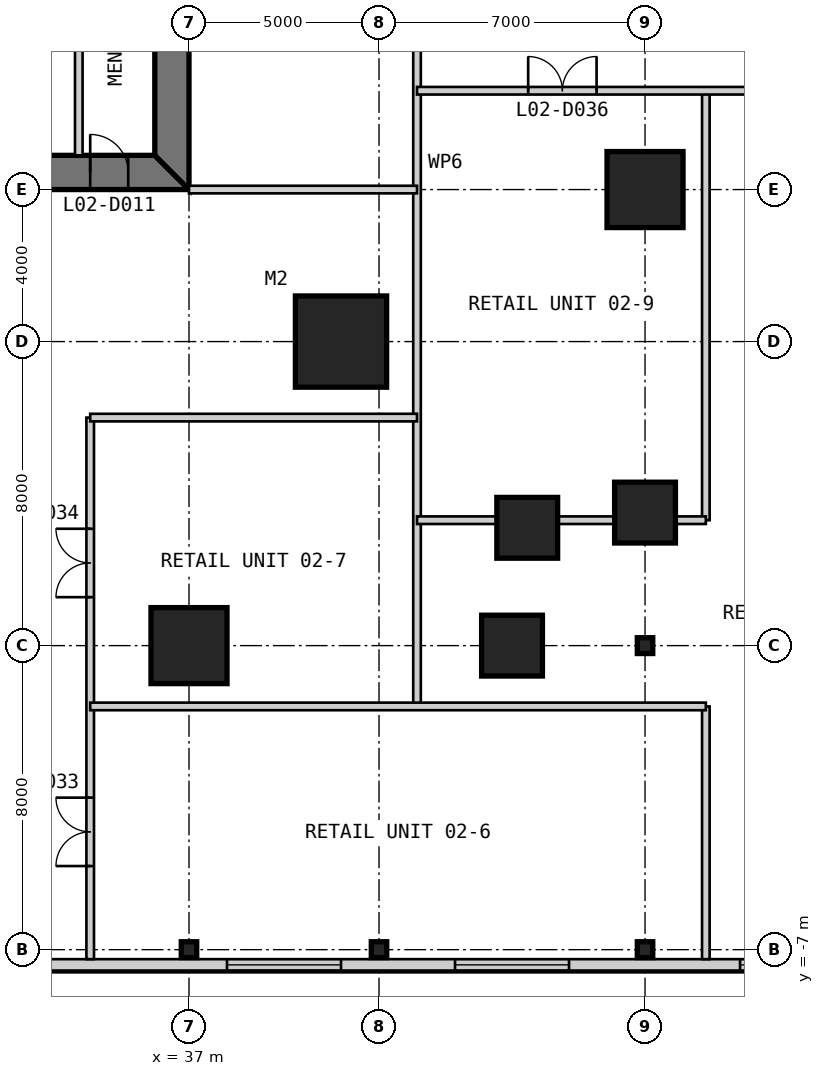
"""IFC4 building model, lengths in metres.
Left out: names, types, materials, properties, quantities, classifications, styles, units other than length and angle.
Written with IfcOpenShell. Run it as: python <this file> out.ifc"""

import sys

from ifc_helpers import new_model, si_unit, direction, frame, frame_2d, origin, origin_2d, place, context, subcontext, project, spatial, polyline, rectangle, i_section, outline, extrude, element, fill, save


model = new_model("IFC4")
c1 = context("Model", 3, precision=1e-05, world=origin(), true_north=direction((0.0, 1.0)))
c2 = subcontext(c1, "Body", "Model", "MODEL_VIEW")
j1 = project(units=[si_unit("LENGTHUNIT", "METRE"), si_unit("PLANEANGLEUNIT", "RADIAN")], contexts=[c1])
p1 = place(None, origin())
s1 = spatial("IfcSite", under=j1, at=p1, CompositionType="ELEMENT")
p2 = place(p1, origin())
s2 = spatial("IfcBuilding", under=s1, at=p2, CompositionType="ELEMENT")
p3 = place(p2, frame((0.0, 0.0, 11.8)))
s3 = spatial("IfcBuildingStorey", under=s2, at=p3, CompositionType="ELEMENT", Elevation=11.8)
p4 = place(p3, frame((41.0, 9.0, 0.0), z_axis=(0.0, 0.0, 1.0), x_axis=(1.0, 0.0, 0.0)))
e1 = element("IfcColumn", 1, at=p4, inside=s3, PredefinedType="COLUMN", context=c2, shape_type="SweptSolid", body=[
    extrude(rectangle(XDim=2.4, YDim=2.4, at=origin_2d()), origin(), (0.0, 0.0, 1.0), 4.8),
])
p5 = place(p3, frame((37.0, 1.0, 0.0), z_axis=(0.0, 0.0, 1.0), x_axis=(1.0, 0.0, 0.0)))
e2 = element("IfcColumn", 2, at=p5, inside=s3, PredefinedType="COLUMN", context=c2, shape_type="SweptSolid", body=[
    extrude(rectangle(XDim=2.0, YDim=2.0, at=origin_2d()), origin(), (0.0, 0.0, 1.0), 4.8),
])
for number, where, z_axis, x_axis in (
    (3, (45.5, 1.0, 0.0), (0.0, 0.0, 1.0), (1.0, 0.0, 0.0)),
    (4, (45.9, 4.1, 0.0), (0.0, 0.0, 1.0), (1.0, 0.0, 0.0)),
    (5, (49.0, 4.5, 0.0), (0.0, 0.0, 1.0), (1.0, 0.0, 0.0)),
):
    element("IfcColumn", number, at=place(p3, frame(where, z_axis=z_axis, x_axis=x_axis)), inside=s3, PredefinedType="COLUMN", context=c2, shape_type="SweptSolid", body=[
        extrude(rectangle(XDim=1.6, YDim=1.6, at=origin_2d()), origin(), (0.0, 0.0, 1.0), 4.8),
    ])
p6 = place(p3, frame((49.0, 13.0, 0.0), z_axis=(0.0, 0.0, 1.0), x_axis=(1.0, 0.0, 0.0)))
e6 = element("IfcColumn", 6, at=p6, inside=s3, PredefinedType="COLUMN", context=c2, shape_type="SweptSolid", body=[
    extrude(rectangle(XDim=2.0, YDim=2.0, at=origin_2d()), origin(), (0.0, 0.0, 1.0), 4.8),
])
for number, where, z_axis, x_axis in (
    (7, (37.0, -7.0, 0.0), (0.0, 0.0, 1.0), (1.0, 0.0, 0.0)),
    (8, (42.0, -7.0, 0.0), (0.0, 0.0, 1.0), (1.0, 0.0, 0.0)),
    (9, (49.0, -7.0, 0.0), (0.0, 0.0, 1.0), (1.0, 0.0, 0.0)),
    (10, (49.0, 1.0, 0.0), (0.0, 0.0, 1.0), (1.0, 0.0, 0.0)),
):
    element("IfcColumn", number, at=place(p3, frame(where, z_axis=z_axis, x_axis=x_axis)), inside=s3, PredefinedType="COLUMN", context=c2, shape_type="SweptSolid", body=[
        extrude(i_section(OverallWidth=0.406, OverallDepth=0.417, WebThickness=0.03, FlangeThickness=0.048, at=origin_2d()), origin(), (0.0, 0.0, 1.0), 4.8),
    ])
p7 = place(p3, frame((13.0, 13.45, 0.0), z_axis=(0.0, 0.0, 1.0), x_axis=(1.0, 0.0, 0.0)))
e11 = element("IfcWall", 11, at=p7, inside=s3, PredefinedType="SHEAR", context=c2, shape_type="SweptSolid", body=[
    extrude(outline(polyline([(0.0, -0.45), (24.0, -0.45), (23.1, 0.45), (0.9, 0.45), (0.0, -0.45)])), origin(), (0.0, 0.0, 1.0), 4.8),
])
p8 = place(p7, frame((4.9, 0.0, 0.0)))
e12 = element("IfcOpeningElement", 12, at=p8, cuts=e11, PredefinedType="OPENING", context=c2, shape_type="SweptSolid", body=[
    extrude(rectangle(XDim=1.0, YDim=2.2, at=frame_2d((0.5, 1.1))), frame((0.0, 0.46, 0.0), z_axis=(0.0, -1.0, 0.0), x_axis=(1.0, 0.0, 0.0)), (0.0, 0.0, 1.0), 0.92),
])
p9 = place(p7, frame((8.9, 0.0, 0.0)))
e13 = element("IfcOpeningElement", 13, at=p9, cuts=e11, PredefinedType="OPENING", context=c2, shape_type="SweptSolid", body=[
    extrude(rectangle(XDim=1.1, YDim=2.2, at=frame_2d((0.55, 1.1))), frame((0.0, 0.46, 0.0), z_axis=(0.0, -1.0, 0.0), x_axis=(1.0, 0.0, 0.0)), (0.0, 0.0, 1.0), 0.92),
])
p10 = place(p7, frame((15.05, 0.0, 0.0)))
e14 = element("IfcOpeningElement", 14, at=p10, cuts=e11, PredefinedType="OPENING", context=c2, shape_type="SweptSolid", body=[
    extrude(rectangle(XDim=0.9, YDim=2.2, at=frame_2d((0.45, 1.1))), frame((0.0, 0.46, 0.0), z_axis=(0.0, -1.0, 0.0), x_axis=(1.0, 0.0, 0.0)), (0.0, 0.0, 1.0), 0.92),
])
p11 = place(p7, frame((17.9, 0.0, 0.0)))
e15 = element("IfcOpeningElement", 15, at=p11, cuts=e11, PredefinedType="OPENING", context=c2, shape_type="SweptSolid", body=[
    extrude(rectangle(XDim=1.0, YDim=2.2, at=frame_2d((0.5, 1.1))), frame((0.0, 0.46, 0.0), z_axis=(0.0, -1.0, 0.0), x_axis=(1.0, 0.0, 0.0)), (0.0, 0.0, 1.0), 0.92),
])
p12 = place(p7, frame((21.4, 0.0, 0.0)))
e16 = element("IfcOpeningElement", 16, at=p12, cuts=e11, PredefinedType="OPENING", context=c2, shape_type="SweptSolid", body=[
    extrude(rectangle(XDim=1.0, YDim=2.2, at=frame_2d((0.5, 1.1))), frame((0.0, 0.46, 0.0), z_axis=(0.0, -1.0, 0.0), x_axis=(1.0, 0.0, 0.0)), (0.0, 0.0, 1.0), 0.92),
])
p13 = place(p3, frame((36.55, 13.9, 0.0), z_axis=(0.0, 0.0, 1.0), x_axis=(0.0, 1.0, 0.0)))
e17 = element("IfcWall", 17, at=p13, inside=s3, PredefinedType="SHEAR", context=c2, shape_type="SweptSolid", body=[
    extrude(outline(polyline([(-0.9, -0.45), (23.1, -0.45), (22.2, 0.45), (0.0, 0.45), (-0.9, -0.45)])), origin(), (0.0, 0.0, 1.0), 4.8),
])
p14 = place(p13, frame((20.2, 0.0, 0.0)))
e18 = element("IfcOpeningElement", 18, at=p14, cuts=e17, PredefinedType="OPENING", context=c2, shape_type="SweptSolid", body=[
    extrude(rectangle(XDim=1.0, YDim=2.2, at=frame_2d((0.5, 1.1))), frame((0.0, 0.46, 0.0), z_axis=(0.0, -1.0, 0.0), x_axis=(1.0, 0.0, 0.0)), (0.0, 0.0, 1.0), 0.92),
])
p15 = place(p13, frame((17.25, 0.0, 0.0)))
e19 = element("IfcOpeningElement", 19, at=p15, cuts=e17, PredefinedType="OPENING", context=c2, shape_type="SweptSolid", body=[
    extrude(rectangle(XDim=0.9, YDim=2.2, at=frame_2d((0.45, 1.1))), frame((0.0, 0.46, 0.0), z_axis=(0.0, -1.0, 0.0), x_axis=(1.0, 0.0, 0.0)), (0.0, 0.0, 1.0), 0.92),
])
p16 = place(p3, frame((-15.55, -7.4, 0.0), z_axis=(0.0, 0.0, 1.0), x_axis=(1.0, 0.0, 0.0)))
e20 = element("IfcWall", 20, at=p16, inside=s3, PredefinedType="SOLIDWALL", context=c2, shape_type="SweptSolid", body=[
    extrude(rectangle(XDim=73.1, YDim=0.3, at=frame_2d((36.55, 0.0))), origin(), (0.0, 0.0, 1.0), 4.5),
])
p17 = place(p16, frame((11.65, 0.0, 0.0)))
e21 = element("IfcOpeningElement", 21, at=p17, cuts=e20, PredefinedType="OPENING", context=c2, shape_type="SweptSolid", body=[
    extrude(rectangle(XDim=1.8, YDim=2.4, at=frame_2d((0.9, 1.2))), frame((0.0, 0.16, 0.0), z_axis=(0.0, -1.0, 0.0), x_axis=(1.0, 0.0, 0.0)), (0.0, 0.0, 1.0), 0.32),
])
p18 = place(p16, frame((45.65, 0.0, 0.0)))
e22 = element("IfcOpeningElement", 22, at=p18, cuts=e20, PredefinedType="OPENING", context=c2, shape_type="SweptSolid", body=[
    extrude(rectangle(XDim=1.8, YDim=2.4, at=frame_2d((0.9, 1.2))), frame((0.0, 0.16, 0.0), z_axis=(0.0, -1.0, 0.0), x_axis=(1.0, 0.0, 0.0)), (0.0, 0.0, 1.0), 0.32),
])
p19 = place(p16, frame((3.05, 0.0, 0.9)))
e23 = element("IfcOpeningElement", 23, at=p19, cuts=e20, PredefinedType="OPENING", context=c2, shape_type="SweptSolid", body=[
    extrude(rectangle(XDim=3.0, YDim=2.4, at=frame_2d((1.5, 1.2))), frame((0.0, 0.16, 0.0), z_axis=(0.0, -1.0, 0.0), x_axis=(1.0, 0.0, 0.0)), (0.0, 0.0, 1.0), 0.32),
])
p20 = place(p16, frame((19.05, 0.0, 0.9)))
e24 = element("IfcOpeningElement", 24, at=p20, cuts=e20, PredefinedType="OPENING", context=c2, shape_type="SweptSolid", body=[
    extrude(rectangle(XDim=3.0, YDim=2.4, at=frame_2d((1.5, 1.2))), frame((0.0, 0.16, 0.0), z_axis=(0.0, -1.0, 0.0), x_axis=(1.0, 0.0, 0.0)), (0.0, 0.0, 1.0), 0.32),
])
p21 = place(p16, frame((33.05, 0.0, 0.9)))
e25 = element("IfcOpeningElement", 25, at=p21, cuts=e20, PredefinedType="OPENING", context=c2, shape_type="SweptSolid", body=[
    extrude(rectangle(XDim=3.0, YDim=2.4, at=frame_2d((1.5, 1.2))), frame((0.0, 0.16, 0.0), z_axis=(0.0, -1.0, 0.0), x_axis=(1.0, 0.0, 0.0)), (0.0, 0.0, 1.0), 0.32),
])
p22 = place(p16, frame((53.55, 0.0, 0.9)))
e26 = element("IfcOpeningElement", 26, at=p22, cuts=e20, PredefinedType="OPENING", context=c2, shape_type="SweptSolid", body=[
    extrude(rectangle(XDim=3.0, YDim=2.4, at=frame_2d((1.5, 1.2))), frame((0.0, 0.16, 0.0), z_axis=(0.0, -1.0, 0.0), x_axis=(1.0, 0.0, 0.0)), (0.0, 0.0, 1.0), 0.32),
])
p23 = place(p16, frame((59.55, 0.0, 0.9)))
e27 = element("IfcOpeningElement", 27, at=p23, cuts=e20, PredefinedType="OPENING", context=c2, shape_type="SweptSolid", body=[
    extrude(rectangle(XDim=3.0, YDim=2.4, at=frame_2d((1.5, 1.2))), frame((0.0, 0.16, 0.0), z_axis=(0.0, -1.0, 0.0), x_axis=(1.0, 0.0, 0.0)), (0.0, 0.0, 1.0), 0.32),
])
p24 = place(p16, frame((67.05, 0.0, 0.9)))
e28 = element("IfcOpeningElement", 28, at=p24, cuts=e20, PredefinedType="OPENING", context=c2, shape_type="SweptSolid", body=[
    extrude(rectangle(XDim=3.0, YDim=2.4, at=frame_2d((1.5, 1.2))), frame((0.0, 0.16, 0.0), z_axis=(0.0, -1.0, 0.0), x_axis=(1.0, 0.0, 0.0)), (0.0, 0.0, 1.0), 0.32),
])
p25 = place(p3, frame((34.1, 13.9, 0.0), z_axis=(0.0, 0.0, 1.0), x_axis=(0.0, 1.0, 0.0)))
e29 = element("IfcWall", 29, at=p25, inside=s3, PredefinedType="PARTITIONING", context=c2, shape_type="SweptSolid", body=[
    extrude(rectangle(XDim=6.1, YDim=0.2, at=frame_2d((3.05, 0.0))), origin(), (0.0, 0.0, 1.0), 4.6),
])
p26 = place(p3, frame((34.4, -7.25, 0.0), z_axis=(0.0, 0.0, 1.0), x_axis=(0.0, 1.0, 0.0)))
e30 = element("IfcWall", 30, at=p26, inside=s3, PredefinedType="PARTITIONING", context=c2, shape_type="SweptSolid", body=[
    extrude(rectangle(XDim=14.25, YDim=0.2, at=frame_2d((7.125, 0.0))), origin(), (0.0, 0.0, 1.0), 4.5),
])
p27 = place(p26, frame((2.45, 0.0, 0.0)))
e31 = element("IfcOpeningElement", 31, at=p27, cuts=e30, PredefinedType="OPENING", context=c2, shape_type="SweptSolid", body=[
    extrude(rectangle(XDim=1.8, YDim=2.4, at=frame_2d((0.9, 1.2))), frame((0.0, 0.11, 0.0), z_axis=(0.0, -1.0, 0.0), x_axis=(1.0, 0.0, 0.0)), (0.0, 0.0, 1.0), 0.22),
])
p28 = place(p26, frame((9.525, 0.0, 0.0)))
e32 = element("IfcOpeningElement", 32, at=p28, cuts=e30, PredefinedType="OPENING", context=c2, shape_type="SweptSolid", body=[
    extrude(rectangle(XDim=1.8, YDim=2.4, at=frame_2d((0.9, 1.2))), frame((0.0, 0.11, 0.0), z_axis=(0.0, -1.0, 0.0), x_axis=(1.0, 0.0, 0.0)), (0.0, 0.0, 1.0), 0.22),
])
p29 = place(p3, frame((43.0, -0.6, 0.0), z_axis=(0.0, 0.0, 1.0), x_axis=(0.0, 1.0, 0.0)))
e33 = element("IfcWall", 33, at=p29, inside=s3, PredefinedType="PARTITIONING", context=c2, shape_type="SweptSolid", body=[
    extrude(rectangle(XDim=28.6, YDim=0.2, at=frame_2d((14.3, 0.0))), origin(), (0.0, 0.0, 1.0), 3.843),
])
p30 = place(p3, frame((50.6, -7.25, 0.0), z_axis=(0.0, 0.0, 1.0), x_axis=(0.0, 1.0, 0.0)))
e34 = element("IfcWall", 34, at=p30, inside=s3, PredefinedType="PARTITIONING", context=c2, shape_type="SweptSolid", body=[
    extrude(rectangle(XDim=6.65, YDim=0.2, at=frame_2d((3.325, 0.0))), origin(), (0.0, 0.0, 1.0), 4.5),
])
p31 = place(p3, frame((50.6, 4.3, 0.0), z_axis=(0.0, 0.0, 1.0), x_axis=(0.0, 1.0, 0.0)))
e35 = element("IfcWall", 35, at=p31, inside=s3, PredefinedType="PARTITIONING", context=c2, shape_type="SweptSolid", body=[
    extrude(rectangle(XDim=11.3, YDim=0.2, at=frame_2d((5.65, 0.0))), origin(), (0.0, 0.0, 1.0), 4.5),
])
p32 = place(p3, frame((34.4, -0.6, 0.0), z_axis=(0.0, 0.0, 1.0), x_axis=(1.0, 0.0, 0.0)))
e36 = element("IfcWall", 36, at=p32, inside=s3, PredefinedType="PARTITIONING", context=c2, shape_type="SweptSolid", body=[
    extrude(rectangle(XDim=16.2, YDim=0.2, at=frame_2d((8.1, 0.0))), origin(), (0.0, 0.0, 1.0), 4.5),
])
p33 = place(p3, frame((43.0, 4.3, 0.0), z_axis=(0.0, 0.0, 1.0), x_axis=(1.0, 0.0, 0.0)))
e37 = element("IfcWall", 37, at=p33, inside=s3, PredefinedType="PARTITIONING", context=c2, shape_type="SweptSolid", body=[
    extrude(rectangle(XDim=2.1, YDim=0.2, at=frame_2d((1.05, 0.0))), origin(), (0.0, 0.0, 1.0), 4.5),
])
p34 = place(p3, frame((46.7, 4.3, 0.0), z_axis=(0.0, 0.0, 1.0), x_axis=(1.0, 0.0, 0.0)))
e38 = element("IfcWall", 38, at=p34, inside=s3, PredefinedType="PARTITIONING", context=c2, shape_type="SweptSolid", body=[
    extrude(rectangle(XDim=1.5, YDim=0.2, at=frame_2d((0.75, 0.0))), origin(), (0.0, 0.0, 1.0), 3.65),
])
p35 = place(p3, frame((49.8, 4.3, 0.0), z_axis=(0.0, 0.0, 1.0), x_axis=(1.0, 0.0, 0.0)))
e39 = element("IfcWall", 39, at=p35, inside=s3, PredefinedType="PARTITIONING", context=c2, shape_type="SweptSolid", body=[
    extrude(rectangle(XDim=0.8, YDim=0.2, at=frame_2d((0.4, 0.0))), origin(), (0.0, 0.0, 1.0), 4.5),
])
p36 = place(p3, frame((34.4, 7.0, 0.0), z_axis=(0.0, 0.0, 1.0), x_axis=(1.0, 0.0, 0.0)))
e40 = element("IfcWall", 40, at=p36, inside=s3, PredefinedType="PARTITIONING", context=c2, shape_type="SweptSolid", body=[
    extrude(rectangle(XDim=8.6, YDim=0.2, at=frame_2d((4.3, 0.0))), origin(), (0.0, 0.0, 1.0), 4.5),
])
p37 = place(p3, frame((37.0, 13.0, 0.0), z_axis=(0.0, 0.0, 1.0), x_axis=(1.0, 0.0, 0.0)))
e41 = element("IfcWall", 41, at=p37, inside=s3, PredefinedType="PARTITIONING", context=c2, shape_type="SweptSolid", body=[
    extrude(rectangle(XDim=6.0, YDim=0.2, at=frame_2d((3.0, 0.0))), origin(), (0.0, 0.0, 1.0), 3.653),
])
p38 = place(p3, frame((43.0, 15.6, 0.0), z_axis=(0.0, 0.0, 1.0), x_axis=(1.0, 0.0, 0.0)))
e42 = element("IfcWall", 42, at=p38, inside=s3, PredefinedType="PARTITIONING", context=c2, shape_type="SweptSolid", body=[
    extrude(rectangle(XDim=14.25, YDim=0.2, at=frame_2d((7.125, 0.0))), origin(), (0.0, 0.0, 1.0), 4.5),
])
p39 = place(p38, frame((10.0, 0.0, 0.0)))
e43 = element("IfcOpeningElement", 43, at=p39, cuts=e42, PredefinedType="OPENING", context=c2, shape_type="SweptSolid", body=[
    extrude(rectangle(XDim=1.8, YDim=2.4, at=frame_2d((0.9, 1.2))), frame((0.0, 0.11, 0.0), z_axis=(0.0, -1.0, 0.0), x_axis=(1.0, 0.0, 0.0)), (0.0, 0.0, 1.0), 0.22),
])
p40 = place(p38, frame((2.925, 0.0, 0.0)))
e44 = element("IfcOpeningElement", 44, at=p40, cuts=e42, PredefinedType="OPENING", context=c2, shape_type="SweptSolid", body=[
    extrude(rectangle(XDim=1.8, YDim=2.4, at=frame_2d((0.9, 1.2))), frame((0.0, 0.11, 0.0), z_axis=(0.0, -1.0, 0.0), x_axis=(1.0, 0.0, 0.0)), (0.0, 0.0, 1.0), 0.22),
])
p41 = place(p22, origin())
e45 = element("IfcWindow", 45, at=p41, inside=s3, PartitioningType="SINGLE_PANEL", PredefinedType="WINDOW", context=c2, shape_type="SweptSolid", body=[
    extrude(rectangle(XDim=3.0, YDim=2.4, at=frame_2d((1.5, 1.2))), frame((0.0, 0.03, 0.0), z_axis=(0.0, -1.0, 0.0), x_axis=(1.0, 0.0, 0.0)), (0.0, 0.0, 1.0), 0.06),
])
fill(e26, e45)
p42 = place(p23, origin())
e46 = element("IfcWindow", 46, at=p42, inside=s3, PartitioningType="SINGLE_PANEL", PredefinedType="WINDOW", context=c2, shape_type="SweptSolid", body=[
    extrude(rectangle(XDim=3.0, YDim=2.4, at=frame_2d((1.5, 1.2))), frame((0.0, 0.03, 0.0), z_axis=(0.0, -1.0, 0.0), x_axis=(1.0, 0.0, 0.0)), (0.0, 0.0, 1.0), 0.06),
])
fill(e27, e46)
p43 = place(p24, origin())
e47 = element("IfcWindow", 47, at=p43, inside=s3, PartitioningType="SINGLE_PANEL", PredefinedType="WINDOW", context=c2, shape_type="SweptSolid", body=[
    extrude(rectangle(XDim=3.0, YDim=2.4, at=frame_2d((1.5, 1.2))), frame((0.0, 0.03, 0.0), z_axis=(0.0, -1.0, 0.0), x_axis=(1.0, 0.0, 0.0)), (0.0, 0.0, 1.0), 0.06),
])
fill(e28, e47)
p44 = place(p12, origin())
e48 = element("IfcDoor", 48, at=p44, inside=s3, OperationType="SINGLE_SWING_LEFT", PredefinedType="DOOR", context=c2, shape_type="SweptSolid", body=[
    extrude(rectangle(XDim=1.0, YDim=2.2, at=frame_2d((0.5, 1.1))), frame((0.0, 0.025, 0.0), z_axis=(0.0, -1.0, 0.0), x_axis=(1.0, 0.0, 0.0)), (0.0, 0.0, 1.0), 0.05),
    extrude(outline(polyline([(0.0, 0.0), (0.04, 0.0), (0.04, 2.16), (0.96, 2.16), (0.96, 0.0), (1.0, 0.0), (1.0, 2.2), (0.0, 2.2), (0.0, 0.0)])), frame((0.0, 0.3, 0.0), z_axis=(0.0, -1.0, 0.0), x_axis=(1.0, 0.0, 0.0)), (0.0, 0.0, 1.0), 0.6),
])
fill(e16, e48)
p45 = place(p27, origin())
e49 = element("IfcDoor", 49, at=p45, inside=s3, OperationType="DOUBLE_DOOR_SINGLE_SWING", PredefinedType="DOOR", context=c2, shape_type="SweptSolid", body=[
    extrude(rectangle(XDim=1.8, YDim=2.4, at=frame_2d((0.9, 1.2))), frame((0.0, 0.025, 0.0), z_axis=(0.0, -1.0, 0.0), x_axis=(1.0, 0.0, 0.0)), (0.0, 0.0, 1.0), 0.05),
])
fill(e31, e49)
p46 = place(p28, origin())
e50 = element("IfcDoor", 50, at=p46, inside=s3, OperationType="DOUBLE_DOOR_SINGLE_SWING", PredefinedType="DOOR", context=c2, shape_type="SweptSolid", body=[
    extrude(rectangle(XDim=1.8, YDim=2.4, at=frame_2d((0.9, 1.2))), frame((0.0, 0.025, 0.0), z_axis=(0.0, -1.0, 0.0), x_axis=(1.0, 0.0, 0.0)), (0.0, 0.0, 1.0), 0.05),
])
fill(e32, e50)
p47 = place(p40, origin())
e51 = element("IfcDoor", 51, at=p47, inside=s3, OperationType="DOUBLE_DOOR_SINGLE_SWING", PredefinedType="DOOR", context=c2, shape_type="SweptSolid", body=[
    extrude(rectangle(XDim=1.8, YDim=2.4, at=frame_2d((0.9, 1.2))), frame((0.0, 0.025, 0.0), z_axis=(0.0, -1.0, 0.0), x_axis=(1.0, 0.0, 0.0)), (0.0, 0.0, 1.0), 0.05),
])
fill(e44, e51)
save(model, sys.argv[1])
